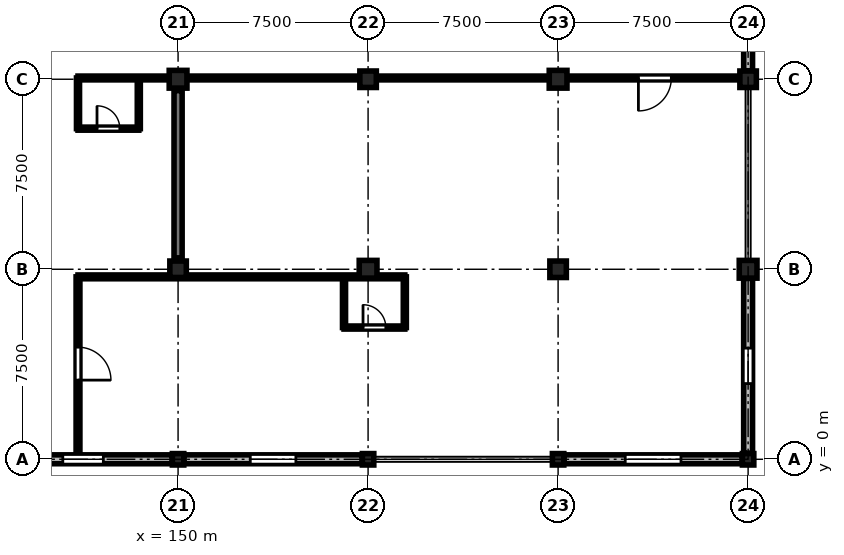
"""IFC4 building model, lengths in metres.
Left out: names, types, materials, properties, quantities, classifications, styles, units other than length and angle.
Written with IfcOpenShell. Run it as: python <this file> out.ifc"""

import sys

from ifc_helpers import new_model, si_unit, direction, frame, frame_2d, origin, origin_2d, place, context, subcontext, project, spatial, rectangle, extrude, element, fill, save


model = new_model("IFC4")
c1 = context("Model", 3, precision=1e-05, world=origin(), true_north=direction((0.0, 1.0)))
c2 = subcontext(c1, "Body", "Model", "MODEL_VIEW")
j1 = project(units=[si_unit("LENGTHUNIT", "METRE"), si_unit("PLANEANGLEUNIT", "RADIAN")], contexts=[c1])
p1 = place(None, origin())
s1 = spatial("IfcSite", under=j1, at=p1, CompositionType="ELEMENT")
p2 = place(p1, origin())
s2 = spatial("IfcBuilding", under=s1, at=p2, CompositionType="ELEMENT")
p3 = place(p2, frame((0.0, 0.0, 9.3)))
s3 = spatial("IfcBuildingStorey", under=s2, at=p3, CompositionType="ELEMENT", Elevation=9.3)
p4 = place(p3, frame((150.0, 0.0, 0.0), z_axis=(0.0, 0.0, 1.0), x_axis=(1.0, 0.0, 0.0)))
e1 = element("IfcColumn", 1, at=p4, inside=s3, PredefinedType="COLUMN", context=c2, shape_type="SweptSolid", body=[
    extrude(rectangle(XDim=0.45, YDim=0.45, at=origin_2d()), origin(), (0.0, 0.0, 1.0), 4.8),
])
p5 = place(p3, frame((150.0, 7.5, 0.0), z_axis=(0.0, 0.0, 1.0), x_axis=(1.0, 0.0, 0.0)))
e2 = element("IfcColumn", 2, at=p5, inside=s3, PredefinedType="COLUMN", context=c2, shape_type="SweptSolid", body=[
    extrude(rectangle(XDim=0.65, YDim=0.65, at=origin_2d()), origin(), (0.0, 0.0, 1.0), 4.8),
])
p6 = place(p3, frame((150.0, 15.0, 0.0), z_axis=(0.0, 0.0, 1.0), x_axis=(1.0, 0.0, 0.0)))
e3 = element("IfcColumn", 3, at=p6, inside=s3, PredefinedType="COLUMN", context=c2, shape_type="SweptSolid", body=[
    extrude(rectangle(XDim=0.7, YDim=0.7, at=origin_2d()), origin(), (0.0, 0.0, 1.0), 4.8),
])
p7 = place(p3, frame((157.5, 0.0, 0.0), z_axis=(0.0, 0.0, 1.0), x_axis=(1.0, 0.0, 0.0)))
e4 = element("IfcColumn", 4, at=p7, inside=s3, PredefinedType="COLUMN", context=c2, shape_type="SweptSolid", body=[
    extrude(rectangle(XDim=0.45, YDim=0.45, at=origin_2d()), origin(), (0.0, 0.0, 1.0), 4.8),
])
p8 = place(p3, frame((157.5, 7.5, 0.0), z_axis=(0.0, 0.0, 1.0), x_axis=(1.0, 0.0, 0.0)))
e5 = element("IfcColumn", 5, at=p8, inside=s3, PredefinedType="COLUMN", context=c2, shape_type="SweptSolid", body=[
    extrude(rectangle(XDim=0.7, YDim=0.7, at=origin_2d()), origin(), (0.0, 0.0, 1.0), 4.8),
])
p9 = place(p3, frame((157.5, 15.0, 0.0), z_axis=(0.0, 0.0, 1.0), x_axis=(1.0, 0.0, 0.0)))
e6 = element("IfcColumn", 6, at=p9, inside=s3, PredefinedType="COLUMN", context=c2, shape_type="SweptSolid", body=[
    extrude(rectangle(XDim=0.65, YDim=0.65, at=origin_2d()), origin(), (0.0, 0.0, 1.0), 4.8),
])
p10 = place(p3, frame((165.0, 0.0, 0.0), z_axis=(0.0, 0.0, 1.0), x_axis=(1.0, 0.0, 0.0)))
e7 = element("IfcColumn", 7, at=p10, inside=s3, PredefinedType="COLUMN", context=c2, shape_type="SweptSolid", body=[
    extrude(rectangle(XDim=0.45, YDim=0.45, at=origin_2d()), origin(), (0.0, 0.0, 1.0), 4.8),
])
p11 = place(p3, frame((165.0, 7.5, 0.0), z_axis=(0.0, 0.0, 1.0), x_axis=(1.0, 0.0, 0.0)))
e8 = element("IfcColumn", 8, at=p11, inside=s3, PredefinedType="COLUMN", context=c2, shape_type="SweptSolid", body=[
    extrude(rectangle(XDim=0.65, YDim=0.65, at=origin_2d()), origin(), (0.0, 0.0, 1.0), 4.8),
])
p12 = place(p3, frame((165.0, 15.0, 0.0), z_axis=(0.0, 0.0, 1.0), x_axis=(1.0, 0.0, 0.0)))
e9 = element("IfcColumn", 9, at=p12, inside=s3, PredefinedType="COLUMN", context=c2, shape_type="SweptSolid", body=[
    extrude(rectangle(XDim=0.7, YDim=0.7, at=origin_2d()), origin(), (0.0, 0.0, 1.0), 4.8),
])
p13 = place(p3, frame((172.5, 0.0, 0.0), z_axis=(0.0, 0.0, 1.0), x_axis=(1.0, 0.0, 0.0)))
e10 = element("IfcColumn", 10, at=p13, inside=s3, PredefinedType="COLUMN", context=c2, shape_type="SweptSolid", body=[
    extrude(rectangle(XDim=0.45, YDim=0.45, at=origin_2d()), origin(), (0.0, 0.0, 1.0), 4.8),
])
p14 = place(p3, frame((172.5, 7.5, 0.0), z_axis=(0.0, 0.0, 1.0), x_axis=(1.0, 0.0, 0.0)))
e11 = element("IfcColumn", 11, at=p14, inside=s3, PredefinedType="COLUMN", context=c2, shape_type="SweptSolid", body=[
    extrude(rectangle(XDim=0.7, YDim=0.7, at=origin_2d()), origin(), (0.0, 0.0, 1.0), 4.8),
])
p15 = place(p3, frame((172.5, 15.0, 0.0), z_axis=(0.0, 0.0, 1.0), x_axis=(1.0, 0.0, 0.0)))
e12 = element("IfcColumn", 12, at=p15, inside=s3, PredefinedType="COLUMN", context=c2, shape_type="SweptSolid", body=[
    extrude(rectangle(XDim=0.65, YDim=0.65, at=origin_2d()), origin(), (0.0, 0.0, 1.0), 4.8),
])
p16 = place(p3, frame((150.0, 7.95, 0.0), z_axis=(0.0, 0.0, 1.0), x_axis=(0.0, 1.0, 0.0)))
e13 = element("IfcWall", 13, at=p16, inside=s3, PredefinedType="SHEAR", context=c2, shape_type="SweptSolid", body=[
    extrude(rectangle(XDim=6.6, YDim=0.32, at=frame_2d((3.3, 0.0))), origin(), (0.0, 0.0, 1.0), 4.0),
])
p17 = place(p3, frame((149.765, 0.0, 0.0), z_axis=(0.0, 0.0, 1.0), x_axis=(-1.0, 0.0, 0.0)))
e14 = element("IfcWall", 14, at=p17, inside=s3, PredefinedType="STANDARD", context=c2, shape_type="SweptSolid", body=[
    extrude(rectangle(XDim=7.03, YDim=0.35, at=frame_2d((3.515, 0.0))), origin(), (0.0, 0.0, 1.0), 3.95),
])
p18 = place(p17, frame((2.715, 0.0, 0.9)))
e15 = element("IfcOpeningElement", 15, at=p18, cuts=e14, PredefinedType="OPENING", context=c2, shape_type="SweptSolid", body=[
    extrude(rectangle(XDim=1.6, YDim=1.95, at=frame_2d((0.8, 0.975))), frame((0.0, 0.185, 0.0), z_axis=(0.0, -1.0, 0.0), x_axis=(1.0, 0.0, 0.0)), (0.0, 0.0, 1.0), 0.37),
])
p19 = place(p3, frame((157.265, 0.0, 0.0), z_axis=(0.0, 0.0, 1.0), x_axis=(-1.0, 0.0, 0.0)))
e16 = element("IfcWall", 16, at=p19, inside=s3, PredefinedType="STANDARD", context=c2, shape_type="SweptSolid", body=[
    extrude(rectangle(XDim=7.03, YDim=0.35, at=frame_2d((3.515, 0.0))), origin(), (0.0, 0.0, 1.0), 3.95),
])
p20 = place(p19, frame((2.615, 0.0, 0.9)))
e17 = element("IfcOpeningElement", 17, at=p20, cuts=e16, PredefinedType="OPENING", context=c2, shape_type="SweptSolid", body=[
    extrude(rectangle(XDim=1.8, YDim=1.95, at=frame_2d((0.9, 0.975))), frame((0.0, 0.185, 0.0), z_axis=(0.0, -1.0, 0.0), x_axis=(1.0, 0.0, 0.0)), (0.0, 0.0, 1.0), 0.37),
])
p21 = place(p3, frame((172.265, 0.0, 0.0), z_axis=(0.0, 0.0, 1.0), x_axis=(-1.0, 0.0, 0.0)))
e18 = element("IfcWall", 18, at=p21, inside=s3, PredefinedType="STANDARD", context=c2, shape_type="SweptSolid", body=[
    extrude(rectangle(XDim=7.03, YDim=0.35, at=frame_2d((3.515, 0.0))), origin(), (0.0, 0.0, 1.0), 3.95),
])
p22 = place(p21, frame((2.415, 0.0, 0.9)))
e19 = element("IfcOpeningElement", 19, at=p22, cuts=e18, PredefinedType="OPENING", context=c2, shape_type="SweptSolid", body=[
    extrude(rectangle(XDim=2.2, YDim=1.95, at=frame_2d((1.1, 0.975))), frame((0.0, 0.185, 0.0), z_axis=(0.0, -1.0, 0.0), x_axis=(1.0, 0.0, 0.0)), (0.0, 0.0, 1.0), 0.37),
])
p23 = place(p3, frame((172.5, 7.14, 0.0), z_axis=(0.0, 0.0, 1.0), x_axis=(0.0, -1.0, 0.0)))
e20 = element("IfcWall", 20, at=p23, inside=s3, PredefinedType="STANDARD", context=c2, shape_type="SweptSolid", body=[
    extrude(rectangle(XDim=6.905, YDim=0.35, at=frame_2d((3.452, 0.0))), origin(), (0.0, 0.0, 1.0), 3.95),
])
p24 = place(p23, frame((2.752, 0.0, 0.9)))
e21 = element("IfcOpeningElement", 21, at=p24, cuts=e20, PredefinedType="OPENING", context=c2, shape_type="SweptSolid", body=[
    extrude(rectangle(XDim=1.4, YDim=1.8, at=frame_2d((0.7, 0.9))), frame((0.0, 0.185, 0.0), z_axis=(0.0, -1.0, 0.0), x_axis=(1.0, 0.0, 0.0)), (0.0, 0.0, 1.0), 0.37),
])
p25 = place(p3, frame((172.5, 22.14, 0.0), z_axis=(0.0, 0.0, 1.0), x_axis=(0.0, -1.0, 0.0)))
e22 = element("IfcWall", 22, at=p25, inside=s3, PredefinedType="STANDARD", context=c2, shape_type="SweptSolid", body=[
    extrude(rectangle(XDim=6.805, YDim=0.35, at=frame_2d((3.402, 0.0))), origin(), (0.0, 0.0, 1.0), 3.95),
])
p26 = place(p25, frame((2.502, 0.0, 0.9)))
e23 = element("IfcOpeningElement", 23, at=p26, cuts=e22, PredefinedType="OPENING", context=c2, shape_type="SweptSolid", body=[
    extrude(rectangle(XDim=1.8, YDim=1.8, at=frame_2d((0.9, 0.9))), frame((0.0, 0.185, 0.0), z_axis=(0.0, -1.0, 0.0), x_axis=(1.0, 0.0, 0.0)), (0.0, 0.0, 1.0), 0.37),
])
p27 = place(p3, frame((146.05, 7.2, 0.0), z_axis=(0.0, 0.0, 1.0), x_axis=(0.0, -1.0, 0.0)))
e24 = element("IfcWall", 24, at=p27, inside=s3, PredefinedType="PARTITIONING", context=c2, shape_type="SweptSolid", body=[
    extrude(rectangle(XDim=6.85, YDim=0.15, at=frame_2d((3.425, 0.0))), origin(), (0.0, 0.0, 1.0), 4.535),
])
p28 = place(p27, frame((2.775, 0.0, 0.0)))
e25 = element("IfcOpeningElement", 25, at=p28, cuts=e24, PredefinedType="OPENING", context=c2, shape_type="SweptSolid", body=[
    extrude(rectangle(XDim=1.3, YDim=2.2, at=frame_2d((0.65, 1.1))), frame((0.0, 0.085, 0.0), z_axis=(0.0, -1.0, 0.0), x_axis=(1.0, 0.0, 0.0)), (0.0, 0.0, 1.0), 0.17),
])
p29 = place(p3, frame((156.55, 5.2, 0.0), z_axis=(0.0, 0.0, 1.0), x_axis=(1.0, 0.0, 0.0)))
e26 = element("IfcWall", 26, at=p29, inside=s3, PredefinedType="PARTITIONING", context=c2, shape_type="SweptSolid", body=[
    extrude(rectangle(XDim=2.4, YDim=0.12, at=frame_2d((1.2, 0.0))), origin(), (0.0, 0.0, 1.0), 4.535),
])
p30 = place(p29, frame((0.75, 0.0, 0.0)))
e27 = element("IfcOpeningElement", 27, at=p30, cuts=e26, PredefinedType="OPENING", context=c2, shape_type="SweptSolid", body=[
    extrude(rectangle(XDim=0.9, YDim=2.1, at=frame_2d((0.45, 1.05))), frame((0.0, 0.07, 0.0), z_axis=(0.0, -1.0, 0.0), x_axis=(1.0, 0.0, 0.0)), (0.0, 0.0, 1.0), 0.14),
])
p31 = place(p3, frame((156.55, 5.2, 0.0), z_axis=(0.0, 0.0, 1.0), x_axis=(0.0, 1.0, 0.0)))
e28 = element("IfcWall", 28, at=p31, inside=s3, PredefinedType="PARTITIONING", context=c2, shape_type="SweptSolid", body=[
    extrude(rectangle(XDim=2.0, YDim=0.12, at=frame_2d((1.0, 0.0))), origin(), (0.0, 0.0, 1.0), 4.535),
])
p32 = place(p3, frame((172.15, 15.05, 0.0), z_axis=(0.0, 0.0, 1.0), x_axis=(-1.0, 0.0, 0.0)))
e29 = element("IfcWall", 29, at=p32, inside=s3, PredefinedType="PARTITIONING", context=c2, shape_type="SweptSolid", body=[
    extrude(rectangle(XDim=26.1, YDim=0.15, at=frame_2d((13.05, 0.0))), origin(), (0.0, 0.0, 1.0), 3.985),
])
p33 = place(p32, frame((2.68, 0.0, 0.0)))
e30 = element("IfcOpeningElement", 30, at=p33, cuts=e29, PredefinedType="OPENING", context=c2, shape_type="SweptSolid", body=[
    extrude(rectangle(XDim=1.3, YDim=2.2, at=frame_2d((0.65, 1.1))), frame((0.0, 0.085, 0.0), z_axis=(0.0, -1.0, 0.0), x_axis=(1.0, 0.0, 0.0)), (0.0, 0.0, 1.0), 0.17),
])
p34 = place(p3, frame((146.05, 13.05, 0.0), z_axis=(0.0, 0.0, 1.0), x_axis=(1.0, 0.0, 0.0)))
e31 = element("IfcWall", 31, at=p34, inside=s3, PredefinedType="PARTITIONING", context=c2, shape_type="SweptSolid", body=[
    extrude(rectangle(XDim=2.4, YDim=0.12, at=frame_2d((1.2, 0.0))), origin(), (0.0, 0.0, 1.0), 4.535),
])
p35 = place(p34, frame((0.75, 0.0, 0.0)))
e32 = element("IfcOpeningElement", 32, at=p35, cuts=e31, PredefinedType="OPENING", context=c2, shape_type="SweptSolid", body=[
    extrude(rectangle(XDim=0.9, YDim=2.1, at=frame_2d((0.45, 1.05))), frame((0.0, 0.07, 0.0), z_axis=(0.0, -1.0, 0.0), x_axis=(1.0, 0.0, 0.0)), (0.0, 0.0, 1.0), 0.14),
])
p36 = place(p3, frame((148.45, 13.05, 0.0), z_axis=(0.0, 0.0, 1.0), x_axis=(0.0, 1.0, 0.0)))
e33 = element("IfcWall", 33, at=p36, inside=s3, PredefinedType="PARTITIONING", context=c2, shape_type="SweptSolid", body=[
    extrude(rectangle(XDim=2.0, YDim=0.12, at=frame_2d((1.0, 0.0))), origin(), (0.0, 0.0, 1.0), 4.535),
])
p37 = place(p3, frame((146.05, 7.2, 0.0), z_axis=(0.0, 0.0, 1.0), x_axis=(1.0, 0.0, 0.0)))
e34 = element("IfcWall", 34, at=p37, inside=s3, PredefinedType="PARTITIONING", context=c2, shape_type="SweptSolid", body=[
    extrude(rectangle(XDim=12.9, YDim=0.15, at=frame_2d((6.45, 0.0))), origin(), (0.0, 0.0, 1.0), 3.985),
])
for number, where, z_axis, x_axis in (
    (35, (158.95, 5.2, 0.0), (0.0, 0.0, 1.0), (0.0, 1.0, 0.0)),
    (36, (146.05, 13.05, 0.0), (0.0, 0.0, 1.0), (0.0, 1.0, 0.0)),
):
    element("IfcWall", number, at=place(p3, frame(where, z_axis=z_axis, x_axis=x_axis)), inside=s3, PredefinedType="PARTITIONING", context=c2, shape_type="SweptSolid", body=[
        extrude(rectangle(XDim=2.0, YDim=0.12, at=frame_2d((1.0, 0.0))), origin(), (0.0, 0.0, 1.0), 4.535),
    ])
p38 = place(p18, origin())
e37 = element("IfcWindow", 37, at=p38, inside=s3, PartitioningType="SINGLE_PANEL", PredefinedType="WINDOW", context=c2, shape_type="SweptSolid", body=[
    extrude(rectangle(XDim=1.6, YDim=1.95, at=frame_2d((0.8, 0.975))), frame((0.0, 0.03, 0.0), z_axis=(0.0, -1.0, 0.0), x_axis=(1.0, 0.0, 0.0)), (0.0, 0.0, 1.0), 0.06),
])
fill(e15, e37)
p39 = place(p20, origin())
e38 = element("IfcWindow", 38, at=p39, inside=s3, PartitioningType="SINGLE_PANEL", PredefinedType="WINDOW", context=c2, shape_type="SweptSolid", body=[
    extrude(rectangle(XDim=1.8, YDim=1.95, at=frame_2d((0.9, 0.975))), frame((0.0, 0.03, 0.0), z_axis=(0.0, -1.0, 0.0), x_axis=(1.0, 0.0, 0.0)), (0.0, 0.0, 1.0), 0.06),
])
fill(e17, e38)
p40 = place(p22, origin())
e39 = element("IfcWindow", 39, at=p40, inside=s3, PartitioningType="SINGLE_PANEL", PredefinedType="WINDOW", context=c2, shape_type="SweptSolid", body=[
    extrude(rectangle(XDim=2.2, YDim=1.95, at=frame_2d((1.1, 0.975))), frame((0.0, 0.03, 0.0), z_axis=(0.0, -1.0, 0.0), x_axis=(1.0, 0.0, 0.0)), (0.0, 0.0, 1.0), 0.06),
])
fill(e19, e39)
p41 = place(p24, origin())
e40 = element("IfcWindow", 40, at=p41, inside=s3, PartitioningType="SINGLE_PANEL", PredefinedType="WINDOW", context=c2, shape_type="SweptSolid", body=[
    extrude(rectangle(XDim=1.4, YDim=1.8, at=frame_2d((0.7, 0.9))), frame((0.0, 0.03, 0.0), z_axis=(0.0, -1.0, 0.0), x_axis=(1.0, 0.0, 0.0)), (0.0, 0.0, 1.0), 0.06),
])
fill(e21, e40)
p42 = place(p28, origin())
e41 = element("IfcDoor", 41, at=p42, inside=s3, OperationType="SINGLE_SWING_RIGHT", PredefinedType="DOOR", context=c2, shape_type="SweptSolid", body=[
    extrude(rectangle(XDim=1.3, YDim=2.2, at=frame_2d((0.65, 1.1))), frame((0.0, 0.025, 0.0), z_axis=(0.0, -1.0, 0.0), x_axis=(1.0, 0.0, 0.0)), (0.0, 0.0, 1.0), 0.05),
])
fill(e25, e41)
p43 = place(p30, origin())
e42 = element("IfcDoor", 42, at=p43, inside=s3, OperationType="SINGLE_SWING_LEFT", PredefinedType="DOOR", context=c2, shape_type="SweptSolid", body=[
    extrude(rectangle(XDim=0.9, YDim=2.1, at=frame_2d((0.45, 1.05))), frame((0.0, 0.025, 0.0), z_axis=(0.0, -1.0, 0.0), x_axis=(1.0, 0.0, 0.0)), (0.0, 0.0, 1.0), 0.05),
])
fill(e27, e42)
p44 = place(p33, origin())
e43 = element("IfcDoor", 43, at=p44, inside=s3, OperationType="SINGLE_SWING_RIGHT", PredefinedType="DOOR", context=c2, shape_type="SweptSolid", body=[
    extrude(rectangle(XDim=1.3, YDim=2.2, at=frame_2d((0.65, 1.1))), frame((0.0, 0.025, 0.0), z_axis=(0.0, -1.0, 0.0), x_axis=(1.0, 0.0, 0.0)), (0.0, 0.0, 1.0), 0.05),
])
fill(e30, e43)
p45 = place(p35, origin())
e44 = element("IfcDoor", 44, at=p45, inside=s3, OperationType="SINGLE_SWING_LEFT", PredefinedType="DOOR", context=c2, shape_type="SweptSolid", body=[
    extrude(rectangle(XDim=0.9, YDim=2.1, at=frame_2d((0.45, 1.05))), frame((0.0, 0.025, 0.0), z_axis=(0.0, -1.0, 0.0), x_axis=(1.0, 0.0, 0.0)), (0.0, 0.0, 1.0), 0.05),
])
fill(e32, e44)
save(model, sys.argv[1])
